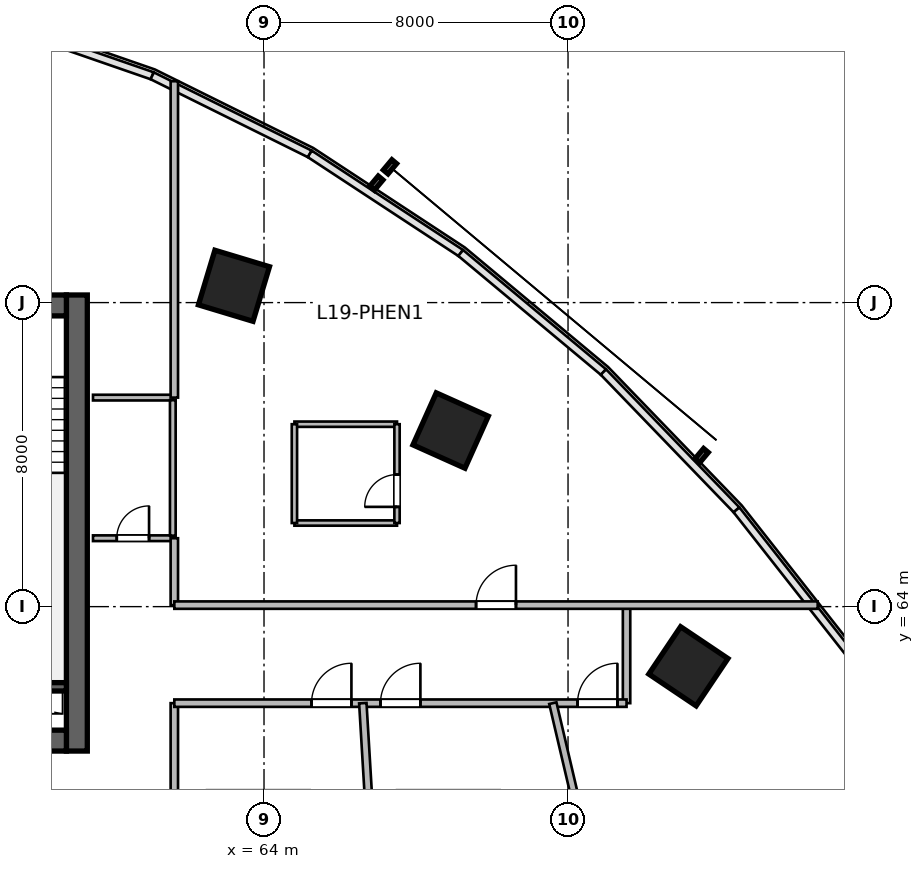
"""IFC4 building model, lengths in metres.
Left out: names, types, materials, properties, quantities, classifications, styles, units other than length and angle.
Written with IfcOpenShell. Run it as: python <this file> out.ifc"""

import sys

from ifc_helpers import new_model, si_unit, direction, frame, frame_2d, origin, origin_2d, place, context, subcontext, project, spatial, rectangle, extrude, source, transform, mapped, element, fill, save


model = new_model("IFC4")
c1 = context("Model", 3, precision=1e-05, world=origin(), true_north=direction((0.0, 1.0)))
c2 = subcontext(c1, "Body", "Model", "MODEL_VIEW")
j1 = project(units=[si_unit("LENGTHUNIT", "METRE"), si_unit("PLANEANGLEUNIT", "RADIAN")], contexts=[c1])
p1 = place(None, origin())
s1 = spatial("IfcSite", under=j1, at=p1, CompositionType="ELEMENT")
p2 = place(p1, origin())
s2 = spatial("IfcBuilding", under=s1, at=p2, CompositionType="ELEMENT")
p3 = place(p2, frame((0.0, 0.0, 82.2)))
s3 = spatial("IfcBuildingStorey", under=s2, at=p3, CompositionType="ELEMENT", Elevation=82.2)
m1 = source(origin(), c2, "Body", "SweptSolid", [
    extrude(rectangle(XDim=12.0, YDim=0.55, at=frame_2d((6.0, 0.0))), origin(), (0.0, 0.0, 1.0), 3.6),
])
p4 = place(p3, frame((59.075, 60.2, 0.0), z_axis=(0.0, 0.0, 1.0), x_axis=(0.0, 1.0, 0.0)))
e1 = element("IfcWall", 1, at=p4, inside=s3, PredefinedType="SHEAR", context=c2, shape_type="MappedRepresentation", body=[
    mapped(m1, transform((0.0, 0.0, 0.0), scale=1.0)),
])
m2 = source(origin(), c2, "Body", "SweptSolid", [
    extrude(rectangle(XDim=21.6, YDim=0.55, at=frame_2d((10.8, 0.0))), origin(), (0.0, 0.0, 1.0), 3.6),
])
p5 = place(p3, frame((37.2, 60.475, 0.0), z_axis=(0.0, 0.0, 1.0), x_axis=(1.0, 0.0, 0.0)))
e2 = element("IfcWall", 2, at=p5, inside=s3, PredefinedType="SHEAR", context=c2, shape_type="MappedRepresentation", body=[
    mapped(m2, transform((0.0, 0.0, 0.0), scale=1.0)),
])
p6 = place(p5, frame((1.1, 0.0, 0.0)))
e3 = element("IfcOpeningElement", 3, at=p6, cuts=e2, PredefinedType="OPENING", context=c2, shape_type="SweptSolid", body=[
    extrude(rectangle(XDim=1.15, YDim=2.15, at=frame_2d((0.575, 1.075))), frame((0.0, 0.285, 0.0), z_axis=(0.0, -1.0, 0.0), x_axis=(1.0, 0.0, 0.0)), (0.0, 0.0, 1.0), 0.57),
])
p7 = place(p5, frame((19.5, 0.0, 0.0)))
e4 = element("IfcOpeningElement", 4, at=p7, cuts=e2, PredefinedType="OPENING", context=c2, shape_type="SweptSolid", body=[
    extrude(rectangle(XDim=0.9, YDim=2.1, at=frame_2d((0.45, 1.05))), frame((0.0, 0.285, 0.0), z_axis=(0.0, -1.0, 0.0), x_axis=(1.0, 0.0, 0.0)), (0.0, 0.0, 1.0), 0.57),
])
p8 = place(p5, frame((12.02, 0.0, 0.0)))
e5 = element("IfcOpeningElement", 5, at=p8, cuts=e2, PredefinedType="OPENING", context=c2, shape_type="SweptSolid", body=[
    extrude(rectangle(XDim=1.6, YDim=2.15, at=frame_2d((0.8, 1.075))), frame((0.0, 0.285, 0.0), z_axis=(0.0, -1.0, 0.0), x_axis=(1.0, 0.0, 0.0)), (0.0, 0.0, 1.0), 0.57),
])
p9 = place(p3, frame((37.2, 71.925, 0.0), z_axis=(0.0, 0.0, 1.0), x_axis=(1.0, 0.0, 0.0)))
e6 = element("IfcWall", 6, at=p9, inside=s3, PredefinedType="SHEAR", context=c2, shape_type="MappedRepresentation", body=[
    mapped(m2, transform((0.0, 0.0, 0.0), scale=1.0)),
])
p10 = place(p9, frame((1.2, 0.0, 0.0)))
e7 = element("IfcOpeningElement", 7, at=p10, cuts=e6, PredefinedType="OPENING", context=c2, shape_type="SweptSolid", body=[
    extrude(rectangle(XDim=0.9, YDim=2.1, at=frame_2d((0.45, 1.05))), frame((0.0, 0.285, 0.0), z_axis=(0.0, -1.0, 0.0), x_axis=(1.0, 0.0, 0.0)), (0.0, 0.0, 1.0), 0.57),
])
p11 = place(p9, frame((14.7, 0.0, 0.0)))
e8 = element("IfcOpeningElement", 8, at=p11, cuts=e6, PredefinedType="OPENING", context=c2, shape_type="SweptSolid", body=[
    extrude(rectangle(XDim=1.2, YDim=2.15, at=frame_2d((0.6, 1.075))), frame((0.0, 0.285, 0.0), z_axis=(0.0, -1.0, 0.0), x_axis=(1.0, 0.0, 0.0)), (0.0, 0.0, 1.0), 0.57),
])
p12 = place(p9, frame((4.15, 0.0, 0.0)))
e9 = element("IfcOpeningElement", 9, at=p12, cuts=e6, PredefinedType="OPENING", context=c2, shape_type="SweptSolid", body=[
    extrude(rectangle(XDim=1.3, YDim=2.15, at=frame_2d((0.65, 1.075))), frame((0.0, 0.285, 0.0), z_axis=(0.0, -1.0, 0.0), x_axis=(1.0, 0.0, 0.0)), (0.0, 0.0, 1.0), 0.57),
])
p13 = place(p9, frame((6.76, 0.0, 0.0)))
e10 = element("IfcOpeningElement", 10, at=p13, cuts=e6, PredefinedType="OPENING", context=c2, shape_type="SweptSolid", body=[
    extrude(rectangle(XDim=0.85, YDim=2.1, at=frame_2d((0.425, 1.05))), frame((0.0, 0.285, 0.0), z_axis=(0.0, -1.0, 0.0), x_axis=(1.0, 0.0, 0.0)), (0.0, 0.0, 1.0), 0.57),
])
p14 = place(p9, frame((8.76, 0.0, 0.0)))
e11 = element("IfcOpeningElement", 11, at=p14, cuts=e6, PredefinedType="OPENING", context=c2, shape_type="SweptSolid", body=[
    extrude(rectangle(XDim=0.85, YDim=2.1, at=frame_2d((0.425, 1.05))), frame((0.0, 0.285, 0.0), z_axis=(0.0, -1.0, 0.0), x_axis=(1.0, 0.0, 0.0)), (0.0, 0.0, 1.0), 0.57),
])
p15 = place(p9, frame((10.725, 0.0, 0.0)))
e12 = element("IfcOpeningElement", 12, at=p15, cuts=e6, PredefinedType="OPENING", context=c2, shape_type="SweptSolid", body=[
    extrude(rectangle(XDim=0.85, YDim=2.1, at=frame_2d((0.425, 1.05))), frame((0.0, 0.285, 0.0), z_axis=(0.0, -1.0, 0.0), x_axis=(1.0, 0.0, 0.0)), (0.0, 0.0, 1.0), 0.57),
])
m3 = source(origin(), c2, "Body", "SweptSolid", [
    extrude(rectangle(XDim=3.27, YDim=0.22, at=frame_2d((1.635, 0.0))), origin(), (0.0, 0.0, 1.0), 3.6),
])
p16 = place(p3, frame((55.53, 61.89, 0.0), z_axis=(0.0, 0.0, 1.0), x_axis=(1.0, 0.0, 0.0)))
e13 = element("IfcWall", 13, at=p16, inside=s3, PredefinedType="SHEAR", context=c2, shape_type="MappedRepresentation", body=[
    mapped(m3, transform((0.0, 0.0, 0.0), scale=1.0)),
])
m4 = source(origin(), c2, "Body", "SweptSolid", [
    extrude(rectangle(XDim=1.5, YDim=1.5, at=origin_2d()), origin(), (0.0, 0.0, 1.0), 3.6),
])
for number, where, z_axis, x_axis in (
    (14, (63.209, 72.442, 0.0), (0.0, 0.0, 1.0), (0.289, 0.957, 0.0)),
    (15, (68.91, 68.633, 0.0), (0.0, 0.0, 1.0), (0.409, 0.912, 0.0)),
    (16, (75.167, 62.43, 0.0), (0.0, 0.0, 1.0), (0.558, 0.83, 0.0)),
):
    element("IfcColumn", number, at=place(p3, frame(where, z_axis=z_axis, x_axis=x_axis)), inside=s3, PredefinedType="COLUMN", context=c2, shape_type="MappedRepresentation", body=[
        mapped(m4, transform((0.0, 0.0, 0.0), scale=1.0)),
    ])
m5 = source(origin(), c2, "Body", "SweptSolid", [
    extrude(rectangle(XDim=2.1, YDim=0.15, at=frame_2d((1.05, 0.0))), origin(), (0.0, 0.0, 1.0), 3.28),
])
p17 = place(p3, frame((59.5, 65.8, 0.0), z_axis=(0.0, 0.0, 1.0), x_axis=(1.0, 0.0, 0.0)))
e17 = element("IfcWall", 17, at=p17, inside=s3, PredefinedType="PARTITIONING", context=c2, shape_type="MappedRepresentation", body=[
    mapped(m5, transform((0.0, 0.0, 0.0), scale=1.0)),
])
p18 = place(p17, frame((0.625, 0.0, 0.0)))
e18 = element("IfcOpeningElement", 18, at=p18, cuts=e17, PredefinedType="OPENING", context=c2, shape_type="SweptSolid", body=[
    extrude(rectangle(XDim=0.85, YDim=2.1, at=frame_2d((0.425, 1.05))), frame((0.0, 0.085, 0.0), z_axis=(0.0, -1.0, 0.0), x_axis=(1.0, 0.0, 0.0)), (0.0, 0.0, 1.0), 0.17),
])
p19 = place(p3, frame((59.5, 69.5, 0.0), z_axis=(0.0, 0.0, 1.0), x_axis=(1.0, 0.0, 0.0)))
e19 = element("IfcWall", 19, at=p19, inside=s3, PredefinedType="PARTITIONING", context=c2, shape_type="MappedRepresentation", body=[
    mapped(m5, transform((0.0, 0.0, 0.0), scale=1.0)),
])
m6 = source(origin(), c2, "Body", "SweptSolid", [
    extrude(rectangle(XDim=3.565, YDim=0.15, at=frame_2d((1.783, 0.0))), origin(), (0.0, 0.0, 1.0), 3.28),
])
p20 = place(p3, frame((61.6, 65.867, 0.0), z_axis=(0.0, 0.0, 1.0), x_axis=(0.0, 1.0, 0.0)))
e20 = element("IfcWall", 20, at=p20, inside=s3, PredefinedType="PARTITIONING", context=c2, shape_type="MappedRepresentation", body=[
    mapped(m6, transform((0.0, 0.0, 0.0), scale=1.0)),
])
m7 = source(origin(), c2, "Body", "SweptSolid", [
    extrude(rectangle(XDim=2.58, YDim=0.195, at=frame_2d((1.29, 0.0))), origin(), (0.0, 0.0, 1.0), 2.847),
])
p21 = place(p3, frame((73.54, 61.46, 0.0), z_axis=(0.0, 0.0, 1.0), x_axis=(0.0, 1.0, 0.0)))
e21 = element("IfcWall", 21, at=p21, inside=s3, PredefinedType="PARTITIONING", context=c2, shape_type="MappedRepresentation", body=[
    mapped(m7, transform((0.0, 0.0, 0.0), scale=1.0)),
])
m8 = source(origin(), c2, "Body", "SweptSolid", [
    extrude(rectangle(XDim=1.76, YDim=0.195, at=frame_2d((0.88, 0.0))), origin(), (0.0, 0.0, 1.0), 3.28),
])
p22 = place(p3, frame((61.64, 64.04, 0.0), z_axis=(0.0, 0.0, 1.0), x_axis=(0.0, 1.0, 0.0)))
e22 = element("IfcWall", 22, at=p22, inside=s3, PredefinedType="PARTITIONING", context=c2, shape_type="MappedRepresentation", body=[
    mapped(m8, transform((0.0, 0.0, 0.0), scale=1.0)),
])
m9 = source(origin(), c2, "Body", "SweptSolid", [
    extrude(rectangle(XDim=8.324, YDim=0.195, at=frame_2d((4.162, 0.0))), origin(), (0.0, 0.0, 1.0), 3.28),
])
p23 = place(p3, frame((61.64, 69.5, 0.0), z_axis=(0.0, 0.0, 1.0), x_axis=(0.0, 1.0, 0.0)))
e23 = element("IfcWall", 23, at=p23, inside=s3, PredefinedType="PARTITIONING", context=c2, shape_type="MappedRepresentation", body=[
    mapped(m9, transform((0.0, 0.0, 0.0), scale=1.0)),
])
m10 = source(origin(), c2, "Body", "SweptSolid", [
    extrude(rectangle(XDim=16.134, YDim=0.195, at=frame_2d((8.067, 0.0))), origin(), (0.0, 0.0, 1.0), 2.564),
])
p24 = place(p3, frame((61.64, 45.326, 0.0), z_axis=(0.0, 0.0, 1.0), x_axis=(0.0, 1.0, 0.0)))
e24 = element("IfcWall", 24, at=p24, inside=s3, PredefinedType="PARTITIONING", context=c2, shape_type="MappedRepresentation", body=[
    mapped(m10, transform((0.0, 0.0, 0.0), scale=1.0)),
])
m11 = source(origin(), c2, "Body", "SweptSolid", [
    extrude(rectangle(XDim=16.93, YDim=0.195, at=frame_2d((8.465, 0.0))), origin(), (0.0, 0.0, 1.0), 3.28),
])
p25 = place(p3, frame((61.64, 64.04, 0.0), z_axis=(0.0, 0.0, 1.0), x_axis=(1.0, 0.0, 0.0)))
e25 = element("IfcWall", 25, at=p25, inside=s3, PredefinedType="PARTITIONING", context=c2, shape_type="MappedRepresentation", body=[
    mapped(m11, transform((0.0, 0.0, 0.0), scale=1.0)),
])
p26 = place(p25, frame((7.94, 0.0, 0.0)))
e26 = element("IfcOpeningElement", 26, at=p26, cuts=e25, PredefinedType="OPENING", context=c2, shape_type="SweptSolid", body=[
    extrude(rectangle(XDim=1.05, YDim=2.15, at=frame_2d((0.525, 1.075))), frame((0.0, 0.107, 0.0), z_axis=(0.0, -1.0, 0.0), x_axis=(1.0, 0.0, 0.0)), (0.0, 0.0, 1.0), 0.215),
])
m12 = source(origin(), c2, "Body", "SweptSolid", [
    extrude(rectangle(XDim=11.9, YDim=0.195, at=frame_2d((5.95, 0.0))), origin(), (0.0, 0.0, 1.0), 3.28),
])
p27 = place(p3, frame((61.64, 61.46, 0.0), z_axis=(0.0, 0.0, 1.0), x_axis=(1.0, 0.0, 0.0)))
e27 = element("IfcWall", 27, at=p27, inside=s3, PredefinedType="PARTITIONING", context=c2, shape_type="MappedRepresentation", body=[
    mapped(m12, transform((0.0, 0.0, 0.0), scale=1.0)),
])
p28 = place(p27, frame((3.61, 0.0, 0.0)))
e28 = element("IfcOpeningElement", 28, at=p28, cuts=e27, PredefinedType="OPENING", context=c2, shape_type="SweptSolid", body=[
    extrude(rectangle(XDim=1.05, YDim=2.15, at=frame_2d((0.525, 1.075))), frame((0.0, 0.107, 0.0), z_axis=(0.0, -1.0, 0.0), x_axis=(1.0, 0.0, 0.0)), (0.0, 0.0, 1.0), 0.215),
])
p29 = place(p27, frame((5.425, 0.0, 0.0)))
e29 = element("IfcOpeningElement", 29, at=p29, cuts=e27, PredefinedType="OPENING", context=c2, shape_type="SweptSolid", body=[
    extrude(rectangle(XDim=1.05, YDim=2.15, at=frame_2d((0.525, 1.075))), frame((0.0, 0.107, 0.0), z_axis=(0.0, -1.0, 0.0), x_axis=(1.0, 0.0, 0.0)), (0.0, 0.0, 1.0), 0.215),
])
p30 = place(p27, frame((10.61, 0.0, 0.0)))
e30 = element("IfcOpeningElement", 30, at=p30, cuts=e27, PredefinedType="OPENING", context=c2, shape_type="SweptSolid", body=[
    extrude(rectangle(XDim=1.05, YDim=2.15, at=frame_2d((0.525, 1.075))), frame((0.0, 0.107, 0.0), z_axis=(0.0, -1.0, 0.0), x_axis=(1.0, 0.0, 0.0)), (0.0, 0.0, 1.0), 0.215),
])
m13 = source(origin(), c2, "Body", "SweptSolid", [
    extrude(rectangle(XDim=24.889, YDim=0.195, at=frame_2d((12.444, 0.0))), origin(), (0.0, 0.0, 1.0), 2.564),
])
p31 = place(p3, frame((68.086, 36.616, 0.0), z_axis=(0.0, 0.0, 1.0), x_axis=(-0.059709317989, 0.998215807, 0.0)))
e31 = element("IfcWall", 31, at=p31, inside=s3, PredefinedType="PARTITIONING", context=c2, shape_type="MappedRepresentation", body=[
    mapped(m13, transform((0.0, 0.0, 0.0), scale=1.0)),
])
m14 = source(origin(), c2, "Body", "SweptSolid", [
    extrude(rectangle(XDim=26.387, YDim=0.195, at=frame_2d((13.194, 0.0))), origin(), (0.0, 0.0, 1.0), 2.847),
])
p32 = place(p3, frame((77.629, 35.771, 0.0), z_axis=(0.0, 0.0, 1.0), x_axis=(-0.228490600532, 0.97354611882, 0.0)))
e32 = element("IfcWall", 32, at=p32, inside=s3, PredefinedType="PARTITIONING", context=c2, shape_type="MappedRepresentation", body=[
    mapped(m14, transform((0.0, 0.0, 0.0), scale=1.0)),
])
m15 = source(origin(), c2, "Body", "SweptSolid", [
    extrude(rectangle(XDim=2.7, YDim=0.14, at=frame_2d((1.35, 0.0))), origin(), (0.0, 0.0, 1.0), 3.28),
])
for number, where, z_axis, x_axis in (
    (33, (64.8, 68.8, 0.0), (0.0, 0.0, 1.0), (1.0, 0.0, 0.0)),
    (34, (64.8, 66.2, 0.0), (0.0, 0.0, 1.0), (1.0, 0.0, 0.0)),
):
    element("IfcWall", number, at=place(p3, frame(where, z_axis=z_axis, x_axis=x_axis)), inside=s3, PredefinedType="PARTITIONING", context=c2, shape_type="MappedRepresentation", body=[
        mapped(m15, transform((0.0, 0.0, 0.0), scale=1.0)),
    ])
m16 = source(origin(), c2, "Body", "SweptSolid", [
    extrude(rectangle(XDim=2.6, YDim=0.14, at=frame_2d((1.3, 0.0))), origin(), (0.0, 0.0, 1.0), 3.28),
])
p33 = place(p3, frame((64.8, 66.2, 0.0), z_axis=(0.0, 0.0, 1.0), x_axis=(0.0, 1.0, 0.0)))
e35 = element("IfcWall", 35, at=p33, inside=s3, PredefinedType="PARTITIONING", context=c2, shape_type="MappedRepresentation", body=[
    mapped(m16, transform((0.0, 0.0, 0.0), scale=1.0)),
])
p34 = place(p3, frame((67.5, 66.2, 0.0), z_axis=(0.0, 0.0, 1.0), x_axis=(0.0, 1.0, 0.0)))
e36 = element("IfcWall", 36, at=p34, inside=s3, PredefinedType="PARTITIONING", context=c2, shape_type="MappedRepresentation", body=[
    mapped(m16, transform((0.0, 0.0, 0.0), scale=1.0)),
])
p35 = place(p34, frame((0.425, 0.0, 0.0)))
e37 = element("IfcOpeningElement", 37, at=p35, cuts=e36, PredefinedType="OPENING", context=c2, shape_type="SweptSolid", body=[
    extrude(rectangle(XDim=0.85, YDim=2.05, at=frame_2d((0.425, 1.025))), frame((0.0, 0.08, 0.0), z_axis=(0.0, -1.0, 0.0), x_axis=(1.0, 0.0, 0.0)), (0.0, 0.0, 1.0), 0.16),
])
m17 = source(origin(), c2, "Body", "SweptSolid", [
    extrude(rectangle(XDim=0.85, YDim=2.1, at=frame_2d((0.425, 1.05))), frame((0.0, 0.025, 0.0), z_axis=(0.0, -1.0, 0.0), x_axis=(1.0, 0.0, 0.0)), (0.0, 0.0, 1.0), 0.05),
])
p36 = place(p18, origin())
e38 = element("IfcDoor", 38, at=p36, inside=s3, OperationType="SINGLE_SWING_RIGHT", PredefinedType="DOOR", context=c2, shape_type="MappedRepresentation", body=[
    mapped(m17, transform((0.0, 0.0, 0.0), scale=1.0)),
])
fill(e18, e38)
m18 = source(origin(), c2, "Body", "SweptSolid", [
    extrude(rectangle(XDim=1.05, YDim=2.15, at=frame_2d((0.525, 1.075))), frame((0.0, 0.025, 0.0), z_axis=(0.0, -1.0, 0.0), x_axis=(1.0, 0.0, 0.0)), (0.0, 0.0, 1.0), 0.05),
])
p37 = place(p26, origin())
e39 = element("IfcDoor", 39, at=p37, inside=s3, OperationType="SINGLE_SWING_RIGHT", PredefinedType="DOOR", context=c2, shape_type="MappedRepresentation", body=[
    mapped(m18, transform((0.0, 0.0, 0.0), scale=1.0)),
])
fill(e26, e39)
m19 = source(origin(), c2, "Body", "SweptSolid", [
    extrude(rectangle(XDim=0.85, YDim=2.05, at=frame_2d((0.425, 1.025))), frame((0.0, 0.025, 0.0), z_axis=(0.0, -1.0, 0.0), x_axis=(1.0, 0.0, 0.0)), (0.0, 0.0, 1.0), 0.05),
])
p38 = place(p35, origin())
e40 = element("IfcDoor", 40, at=p38, inside=s3, OperationType="SINGLE_SWING_LEFT", PredefinedType="DOOR", context=c2, shape_type="MappedRepresentation", body=[
    mapped(m19, transform((0.0, 0.0, 0.0), scale=1.0)),
])
fill(e37, e40)
p39 = place(p28, origin())
e41 = element("IfcDoor", 41, at=p39, inside=s3, OperationType="SINGLE_SWING_RIGHT", PredefinedType="DOOR", context=c2, shape_type="MappedRepresentation", body=[
    mapped(m18, transform((0.0, 0.0, 0.0), scale=1.0)),
])
fill(e28, e41)
p40 = place(p29, origin())
e42 = element("IfcDoor", 42, at=p40, inside=s3, OperationType="SINGLE_SWING_RIGHT", PredefinedType="DOOR", context=c2, shape_type="MappedRepresentation", body=[
    mapped(m18, transform((0.0, 0.0, 0.0), scale=1.0)),
])
fill(e29, e42)
p41 = place(p30, origin())
e43 = element("IfcDoor", 43, at=p41, inside=s3, OperationType="SINGLE_SWING_RIGHT", PredefinedType="DOOR", context=c2, shape_type="MappedRepresentation", body=[
    mapped(m18, transform((0.0, 0.0, 0.0), scale=1.0)),
])
fill(e30, e43)
save(model, sys.argv[1])
